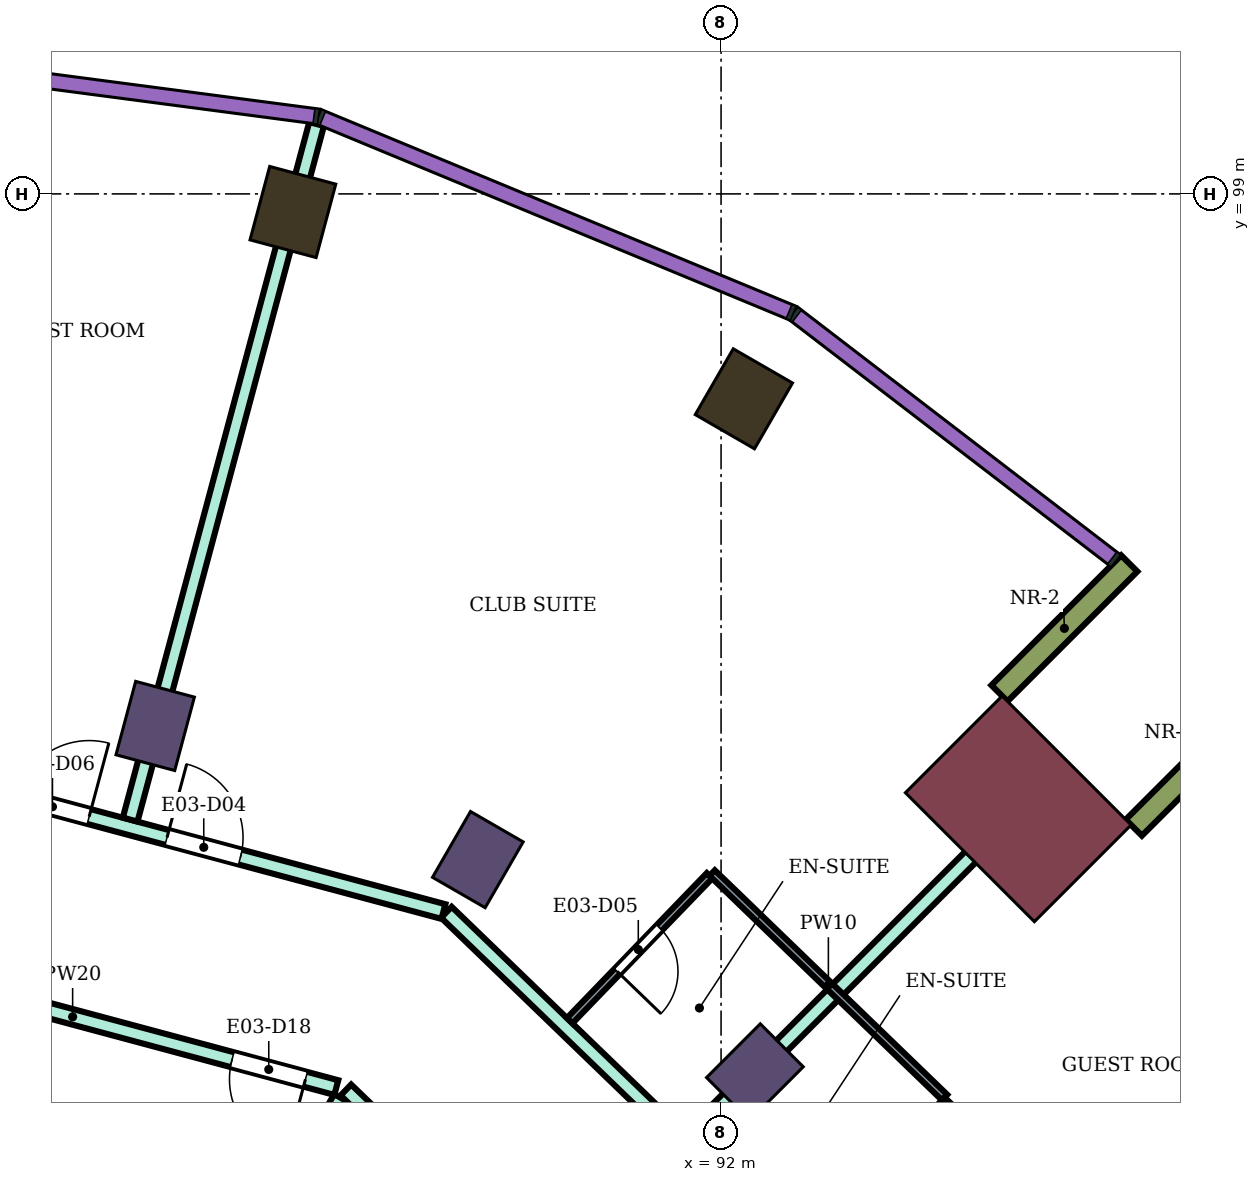
"""IFC4 building model, lengths in metres.
Left out: names, types, materials, properties, quantities, classifications, styles, units other than length and angle.
Written with IfcOpenShell. Run it as: python <this file> out.ifc"""

import sys

from ifc_helpers import new_model, si_unit, direction, frame, frame_2d, origin, origin_2d, place, context, subcontext, project, spatial, rectangle, extrude, element, fill, save


model = new_model("IFC4")
c1 = context("Model", 3, precision=1e-05, world=origin(), true_north=direction((0.0, 1.0)))
c2 = subcontext(c1, "Body", "Model", "MODEL_VIEW")
j1 = project(units=[si_unit("LENGTHUNIT", "METRE"), si_unit("PLANEANGLEUNIT", "RADIAN")], contexts=[c1])
p1 = place(None, origin())
s1 = spatial("IfcSite", under=j1, at=p1, CompositionType="ELEMENT")
p2 = place(p1, origin())
s2 = spatial("IfcBuilding", under=s1, at=p2, CompositionType="ELEMENT")
p3 = place(p2, frame((0.0, 0.0, 141.9)))
s3 = spatial("IfcBuildingStorey", under=s2, at=p3, CompositionType="ELEMENT", Elevation=141.9)
for number, where, z_axis, x_axis in (
    (1, (92.3, 96.304, 0.0), (0.0, 0.0, 1.0), (0.5, 0.866, 0.0)),
    (2, (86.367, 98.762, 0.0), (0.0, 0.0, 1.0), (0.259, 0.966, 0.0)),
):
    element("IfcColumn", number, at=place(p3, frame(where, z_axis=z_axis, x_axis=x_axis)), inside=s3, PredefinedType="COLUMN", context=c2, shape_type="SweptSolid", body=[
        extrude(rectangle(XDim=1.0, YDim=0.9, at=origin_2d()), origin(), (0.0, 0.0, 1.0), 3.9),
    ])
for number, where, z_axis, x_axis in (
    (3, (92.445, 87.445, 0.0), (0.0, 0.0, 1.0), (0.707, 0.707, 0.0)),
    (4, (88.8, 90.242, 0.0), (0.0, 0.0, 1.0), (0.5, 0.866, 0.0)),
    (5, (84.555, 92.0, 0.0), (0.0, 0.0, 1.0), (0.259, 0.966, 0.0)),
):
    element("IfcColumn", number, at=place(p3, frame(where, z_axis=z_axis, x_axis=x_axis)), inside=s3, PredefinedType="COLUMN", context=c2, shape_type="SweptSolid", body=[
        extrude(rectangle(XDim=1.0, YDim=0.8, at=origin_2d()), origin(), (0.0, 0.0, 1.0), 3.9),
    ])
p4 = place(p3, frame((95.91, 90.91, 0.0), z_axis=(0.0, 0.0, 1.0), x_axis=(0.707106781187, 0.707106781187, 0.0)))
e6 = element("IfcColumn", 6, at=p4, inside=s3, PredefinedType="COLUMN", context=c2, shape_type="SweptSolid", body=[
    extrude(rectangle(XDim=1.8, YDim=2.4, at=origin_2d()), origin(), (0.0, 0.0, 1.0), 3.9),
])
for number, where, z_axis, x_axis in (
    (7, (97.43, 90.662, 0.0), (0.0, 0.0, 1.0), (0.707, 0.707, 0.0)),
    (8, (95.662, 92.43, 0.0), (0.0, 0.0, 1.0), (0.707, 0.707, 0.0)),
):
    element("IfcWall", number, at=place(p3, frame(where, z_axis=z_axis, x_axis=x_axis)), inside=s3, PredefinedType="NOTDEFINED", context=c2, shape_type="SweptSolid", body=[
        extrude(rectangle(XDim=2.416, YDim=0.3, at=frame_2d((1.208, 0.0))), origin(), (0.0, 0.0, 1.0), 3.9),
    ])
p5 = place(p3, frame((80.0, 89.104, 0.0), z_axis=(0.0, 0.0, 1.0), x_axis=(0.965854247166, -0.25908603442, 0.0)))
e9 = element("IfcWall", 9, at=p5, inside=s3, PredefinedType="PARTITIONING", context=c2, shape_type="SweptSolid", body=[
    extrude(rectangle(XDim=7.183, YDim=0.2, at=frame_2d((3.592, 0.0))), origin(), (0.0, 0.0, 1.0), 3.45),
])
p6 = place(p5, frame((5.763, 0.0, 0.0)))
e10 = element("IfcOpeningElement", 10, at=p6, cuts=e9, PredefinedType="OPENING", context=c2, shape_type="SweptSolid", body=[
    extrude(rectangle(XDim=1.0, YDim=2.1, at=frame_2d((0.5, 1.05))), frame((0.0, 0.11, 0.0), z_axis=(0.0, -1.0, 0.0), x_axis=(1.0, 0.0, 0.0)), (0.0, 0.0, 1.0), 0.22),
])
p7 = place(p3, frame((80.0, 91.796, 0.0), z_axis=(0.0, 0.0, 1.0), x_axis=(0.965891796243, -0.258946013582, 0.0)))
e11 = element("IfcWall", 11, at=p7, inside=s3, PredefinedType="PARTITIONING", context=c2, shape_type="SweptSolid", body=[
    extrude(rectangle(XDim=8.642, YDim=0.2, at=frame_2d((4.321, 0.0))), origin(), (0.0, 0.0, 1.0), 3.45),
])
p8 = place(p7, frame((4.877, 0.0, 0.0)))
e12 = element("IfcOpeningElement", 12, at=p8, cuts=e11, PredefinedType="OPENING", context=c2, shape_type="SweptSolid", body=[
    extrude(rectangle(XDim=1.0, YDim=2.1, at=frame_2d((0.5, 1.05))), frame((0.0, 0.11, 0.0), z_axis=(0.0, -1.0, 0.0), x_axis=(1.0, 0.0, 0.0)), (0.0, 0.0, 1.0), 0.22),
])
p9 = place(p7, frame((2.817, 0.0, 0.0)))
e13 = element("IfcOpeningElement", 13, at=p9, cuts=e11, PredefinedType="OPENING", context=c2, shape_type="SweptSolid", body=[
    extrude(rectangle(XDim=1.0, YDim=2.1, at=frame_2d((0.5, 1.05))), frame((0.0, 0.11, 0.0), z_axis=(0.0, -1.0, 0.0), x_axis=(1.0, 0.0, 0.0)), (0.0, 0.0, 1.0), 0.22),
])
p10 = place(p3, frame((83.854, 81.665, 0.0), z_axis=(0.0, 0.0, 1.0), x_axis=(0.500241355856, 0.865886012066, 0.0)))
e14 = element("IfcWall", 14, at=p10, inside=s3, PredefinedType="PARTITIONING", context=c2, shape_type="SweptSolid", body=[
    extrude(rectangle(XDim=6.285, YDim=0.2, at=frame_2d((3.143, 0.0))), origin(), (0.0, 0.0, 1.0), 3.45),
])
p11 = place(p3, frame((84.226, 90.768, 0.0), z_axis=(0.0, 0.0, 1.0), x_axis=(0.258891088655, 0.965906519398, 0.0)))
e15 = element("IfcWall", 15, at=p11, inside=s3, PredefinedType="PARTITIONING", context=c2, shape_type="SweptSolid", body=[
    extrude(rectangle(XDim=9.474, YDim=0.2, at=frame_2d((4.737, 0.0))), origin(), (0.0, 0.0, 1.0), 3.45),
])
p12 = place(p3, frame((87.064, 87.211, 0.0), z_axis=(0.0, 0.0, 1.0), x_axis=(0.719562412484, -0.694427774891, 0.0)))
e16 = element("IfcWall", 16, at=p12, inside=s3, PredefinedType="PARTITIONING", context=c2, shape_type="SweptSolid", body=[
    extrude(rectangle(XDim=5.488, YDim=0.2, at=frame_2d((2.744, 0.0))), origin(), (0.0, 0.0, 1.0), 3.45),
])
p13 = place(p12, frame((2.294, 0.0, 0.0)))
e17 = element("IfcOpeningElement", 17, at=p13, cuts=e16, PredefinedType="OPENING", context=c2, shape_type="SweptSolid", body=[
    extrude(rectangle(XDim=0.9, YDim=2.1, at=frame_2d((0.45, 1.05))), frame((0.0, 0.11, 0.0), z_axis=(0.0, -1.0, 0.0), x_axis=(1.0, 0.0, 0.0)), (0.0, 0.0, 1.0), 0.22),
])
p14 = place(p3, frame((88.386, 89.549, 0.0), z_axis=(0.0, 0.0, 1.0), x_axis=(0.719507339337, -0.694484836869, 0.0)))
e18 = element("IfcWall", 18, at=p14, inside=s3, PredefinedType="PARTITIONING", context=c2, shape_type="SweptSolid", body=[
    extrude(rectangle(XDim=6.635, YDim=0.2, at=frame_2d((3.317, 0.0))), origin(), (0.0, 0.0, 1.0), 3.45),
])
p15 = place(p3, frame((91.595, 86.591, 0.0), z_axis=(0.0, 0.0, 1.0), x_axis=(0.707214399597, 0.706999146394, 0.0)))
e19 = element("IfcWall", 19, at=p15, inside=s3, PredefinedType="PARTITIONING", context=c2, shape_type="SweptSolid", body=[
    extrude(rectangle(XDim=6.805, YDim=0.2, at=frame_2d((3.403, 0.0))), origin(), (0.0, 0.0, 1.0), 3.45),
])
p16 = place(p3, frame((90.008, 88.123, 0.0), z_axis=(0.0, 0.0, 1.0), x_axis=(0.694372521817, 0.719615731447, 0.0)))
e20 = element("IfcWall", 20, at=p16, inside=s3, PredefinedType="PARTITIONING", context=c2, shape_type="SweptSolid", body=[
    extrude(rectangle(XDim=2.65, YDim=0.1, at=frame_2d((1.325, 0.0))), origin(), (0.0, 0.0, 1.0), 3.45),
])
p17 = place(p16, frame((0.9, 0.0, 0.0)))
e21 = element("IfcOpeningElement", 21, at=p17, cuts=e20, PredefinedType="OPENING", context=c2, shape_type="SweptSolid", body=[
    extrude(rectangle(XDim=0.8, YDim=2.1, at=frame_2d((0.4, 1.05))), frame((0.0, 0.06, 0.0), z_axis=(0.0, -1.0, 0.0), x_axis=(1.0, 0.0, 0.0)), (0.0, 0.0, 1.0), 0.12),
])
p18 = place(p3, frame((91.883, 90.066, 0.0), z_axis=(0.0, 0.0, 1.0), x_axis=(0.719460839421, -0.694533008963, 0.0)))
e22 = element("IfcWall", 22, at=p18, inside=s3, PredefinedType="PARTITIONING", context=c2, shape_type="SweptSolid", body=[
    extrude(rectangle(XDim=4.25, YDim=0.1, at=frame_2d((2.125, 0.0))), origin(), (0.0, 0.0, 1.0), 3.45),
])
p19 = place(p3, frame((93.103, 85.136, 0.0), z_axis=(0.0, 0.0, 1.0), x_axis=(0.694287838235, 0.719697434815, 0.0)))
e23 = element("IfcWall", 23, at=p19, inside=s3, PredefinedType="PARTITIONING", context=c2, shape_type="SweptSolid", body=[
    extrude(rectangle(XDim=2.7, YDim=0.1, at=frame_2d((1.35, 0.0))), origin(), (0.0, 0.0, 1.0), 3.45),
])
p20 = place(p19, frame((1.05, 0.0, 0.0)))
e24 = element("IfcOpeningElement", 24, at=p20, cuts=e23, PredefinedType="OPENING", context=c2, shape_type="SweptSolid", body=[
    extrude(rectangle(XDim=0.8, YDim=2.1, at=frame_2d((0.4, 1.05))), frame((0.0, 0.06, 0.0), z_axis=(0.0, -1.0, 0.0), x_axis=(1.0, 0.0, 0.0)), (0.0, 0.0, 1.0), 0.12),
])
p21 = place(p3, frame((94.8, 83.545, 0.0), z_axis=(0.0, 0.0, 1.0), x_axis=(0.86602264145, 0.500004784474, 0.0)))
e25 = element("IfcWall", 25, at=p21, inside=s3, PredefinedType="PARTITIONING", context=c2, shape_type="SweptSolid", body=[
    extrude(rectangle(XDim=8.708, YDim=0.1, at=frame_2d((4.354, 0.0))), origin(), (0.0, 0.0, 1.0), 3.45),
])
p22 = place(p21, frame((3.879, 0.0, 0.0)))
e26 = element("IfcOpeningElement", 26, at=p22, cuts=e25, PredefinedType="OPENING", context=c2, shape_type="SweptSolid", body=[
    extrude(rectangle(XDim=0.9, YDim=2.1, at=frame_2d((0.45, 1.05))), frame((0.0, 0.06, 0.0), z_axis=(0.0, -1.0, 0.0), x_axis=(1.0, 0.0, 0.0)), (0.0, 0.0, 1.0), 0.12),
])
p23 = place(p8, origin())
e27 = element("IfcDoor", 27, at=p23, inside=s3, OperationType="SINGLE_SWING_LEFT", PredefinedType="DOOR", context=c2, shape_type="SweptSolid", body=[
    extrude(rectangle(XDim=1.0, YDim=2.1, at=frame_2d((0.5, 1.05))), frame((0.0, 0.025, 0.0), z_axis=(0.0, -1.0, 0.0), x_axis=(1.0, 0.0, 0.0)), (0.0, 0.0, 1.0), 0.05),
])
fill(e12, e27)
p24 = place(p17, frame((0.8, 0.0, 0.0), z_axis=(0.0, 0.0, 1.0), x_axis=(-1.0, 0.0, 0.0)))
e28 = element("IfcDoor", 28, at=p24, inside=s3, OperationType="SINGLE_SWING_RIGHT", PredefinedType="DOOR", context=c2, shape_type="SweptSolid", body=[
    extrude(rectangle(XDim=0.8, YDim=2.1, at=frame_2d((0.4, 1.05))), frame((0.0, 0.025, 0.0), z_axis=(0.0, -1.0, 0.0), x_axis=(1.0, 0.0, 0.0)), (0.0, 0.0, 1.0), 0.05),
])
fill(e21, e28)
p25 = place(p9, origin())
e29 = element("IfcDoor", 29, at=p25, inside=s3, OperationType="SINGLE_SWING_RIGHT", PredefinedType="DOOR", context=c2, shape_type="SweptSolid", body=[
    extrude(rectangle(XDim=1.0, YDim=2.1, at=frame_2d((0.5, 1.05))), frame((0.0, 0.025, 0.0), z_axis=(0.0, -1.0, 0.0), x_axis=(1.0, 0.0, 0.0)), (0.0, 0.0, 1.0), 0.05),
])
fill(e13, e29)
p26 = place(p6, frame((1.0, 0.0, 0.0), z_axis=(0.0, 0.0, 1.0), x_axis=(-1.0, 0.0, 0.0)))
e30 = element("IfcDoor", 30, at=p26, inside=s3, OperationType="SINGLE_SWING_LEFT", PredefinedType="DOOR", context=c2, shape_type="SweptSolid", body=[
    extrude(rectangle(XDim=1.0, YDim=2.1, at=frame_2d((0.5, 1.05))), frame((0.0, 0.025, 0.0), z_axis=(0.0, -1.0, 0.0), x_axis=(1.0, 0.0, 0.0)), (0.0, 0.0, 1.0), 0.05),
])
fill(e10, e30)
save(model, sys.argv[1])
